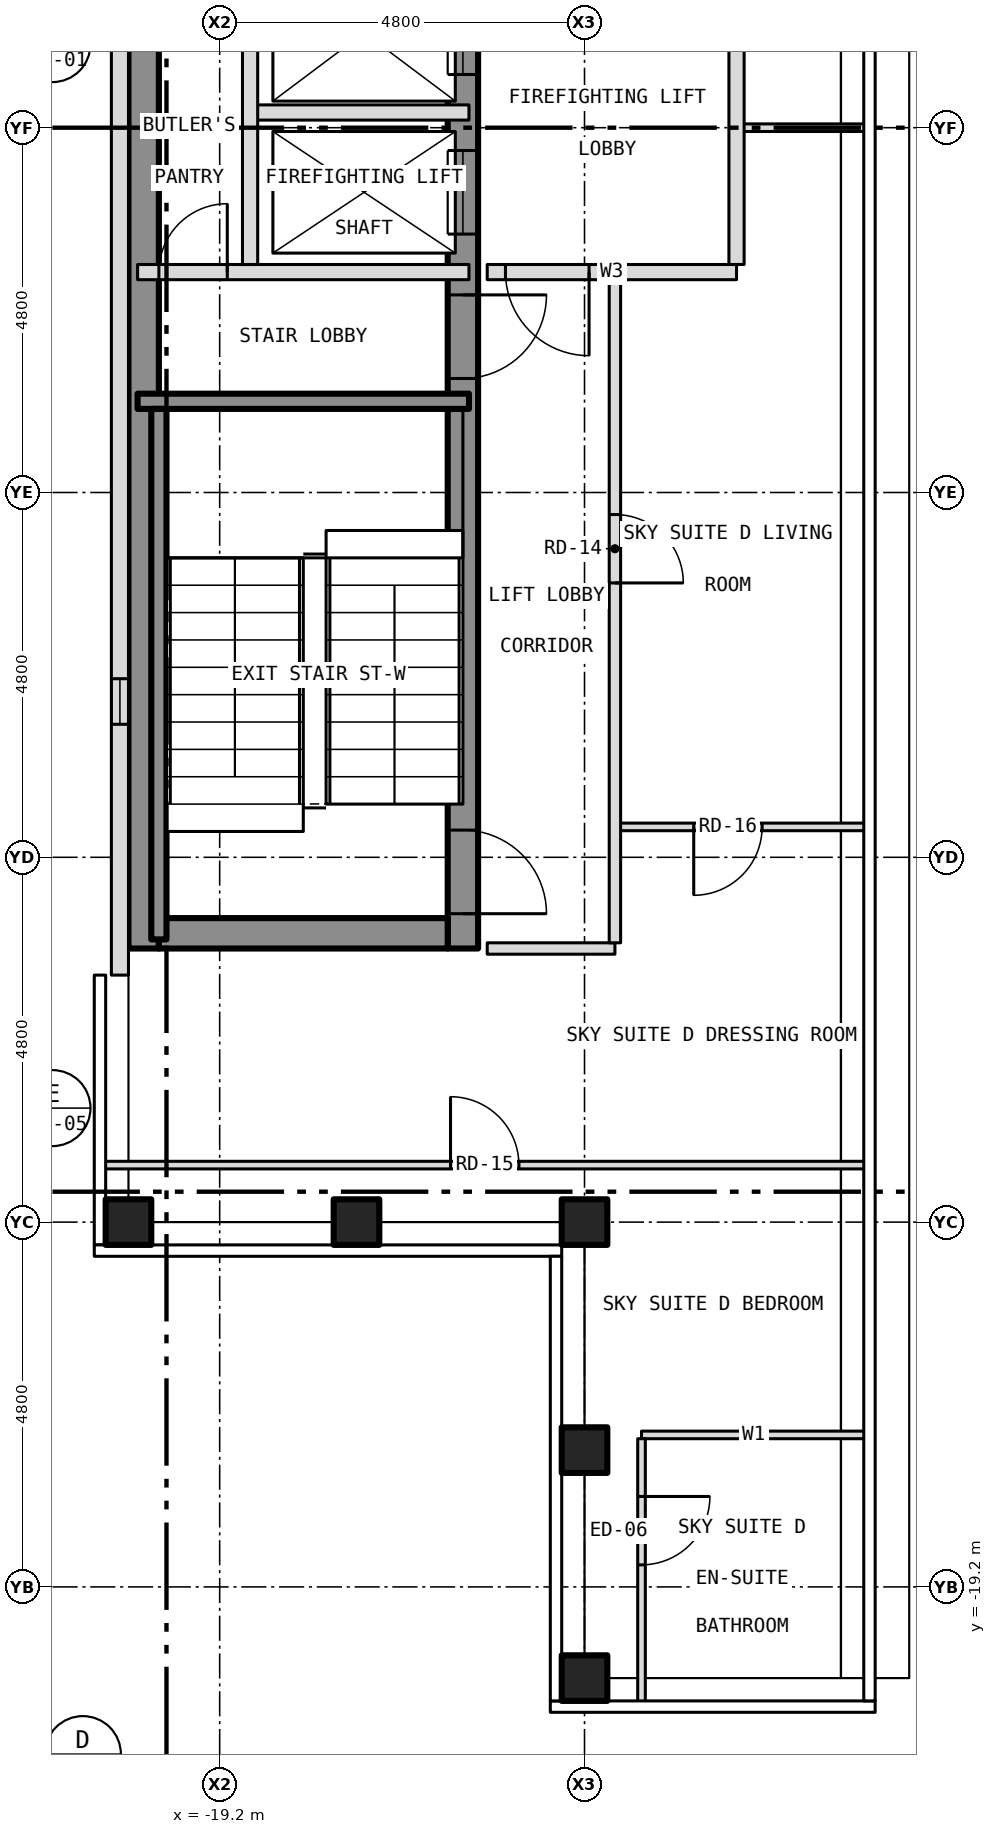
"""IFC4 building model, lengths in metres.
Left out: names, types, materials, properties, quantities, classifications, styles, units other than length and angle.
Written with IfcOpenShell. Run it as: python <this file> out.ifc"""

import sys

from ifc_helpers import new_model, si_unit, direction, frame, frame_2d, origin, origin_2d, place, context, subcontext, project, spatial, rectangle, hollow_rectangle, extrude, element, fill, save


model = new_model("IFC4")
c1 = context("Model", 3, precision=1e-05, world=origin(), true_north=direction((0.0, 1.0)))
c2 = subcontext(c1, "Body", "Model", "MODEL_VIEW")
j1 = project(units=[si_unit("LENGTHUNIT", "METRE"), si_unit("PLANEANGLEUNIT", "RADIAN")], contexts=[c1])
p1 = place(None, origin())
s1 = spatial("IfcSite", under=j1, at=p1, CompositionType="ELEMENT")
p2 = place(p1, origin())
s2 = spatial("IfcBuilding", under=s1, at=p2, CompositionType="ELEMENT")
p3 = place(p2, frame((0.0, 0.0, 283.0)))
s3 = spatial("IfcBuildingStorey", under=s2, at=p3, CompositionType="ELEMENT", Elevation=283.0)
for number, where, z_axis, x_axis in (
    (1, (-14.4, -20.4, -0.15), (0.0, 0.0, 1.0), (1.0, 0.0, 0.0)),
    (2, (-20.4, -14.4, -0.15), (0.0, 0.0, 1.0), (1.0, 0.0, 0.0)),
    (3, (-14.4, -14.4, -0.15), (0.0, 0.0, 1.0), (1.0, 0.0, 0.0)),
    (4, (-14.4, -17.4, -0.15), (0.0, 0.0, 1.0), (1.0, 0.0, 0.0)),
    (5, (-17.4, -14.4, -0.15), (0.0, 0.0, 1.0), (1.0, 0.0, 0.0)),
):
    element("IfcColumn", number, at=place(p3, frame(where, z_axis=z_axis, x_axis=x_axis)), inside=s3, PredefinedType="COLUMN", context=c2, shape_type="SweptSolid", body=[
        extrude(hollow_rectangle(XDim=0.6, YDim=0.6, WallThickness=0.03, at=origin_2d()), origin(), (0.0, 0.0, 1.0), 3.5),
    ])
p4 = place(p3, frame((-16.0, -10.8, 0.0), z_axis=(0.0, 0.0, 1.0), x_axis=(0.0, 1.0, 0.0)))
e6 = element("IfcWall", 6, at=p4, inside=s3, PredefinedType="SHEAR", context=c2, shape_type="SweptSolid", body=[
    extrude(rectangle(XDim=21.6, YDim=0.4, at=frame_2d((10.8, 0.0))), origin(), (0.0, 0.0, 1.0), 3.25),
])
p5 = place(p4, frame((9.4, 0.0, 0.0)))
e7 = element("IfcOpeningElement", 7, at=p5, cuts=e6, PredefinedType="OPENING", context=c2, shape_type="SweptSolid", body=[
    extrude(rectangle(XDim=1.1, YDim=2.1, at=frame_2d((0.55, 1.05))), frame((0.0, 0.212, 0.0), z_axis=(0.0, -1.0, 0.0), x_axis=(1.0, 0.0, 0.0)), (0.0, 0.0, 1.0), 0.424),
])
p6 = place(p4, frame((11.5, 0.0, 0.0)))
e8 = element("IfcOpeningElement", 8, at=p6, cuts=e6, PredefinedType="OPENING", context=c2, shape_type="SweptSolid", body=[
    extrude(rectangle(XDim=1.1, YDim=2.1, at=frame_2d((0.55, 1.05))), frame((0.0, 0.212, 0.0), z_axis=(0.0, -1.0, 0.0), x_axis=(1.0, 0.0, 0.0)), (0.0, 0.0, 1.0), 0.424),
])
p7 = place(p4, frame((13.6, 0.0, 0.0)))
e9 = element("IfcOpeningElement", 9, at=p7, cuts=e6, PredefinedType="OPENING", context=c2, shape_type="SweptSolid", body=[
    extrude(rectangle(XDim=1.1, YDim=2.1, at=frame_2d((0.55, 1.05))), frame((0.0, 0.212, 0.0), z_axis=(0.0, -1.0, 0.0), x_axis=(1.0, 0.0, 0.0)), (0.0, 0.0, 1.0), 0.424),
])
p8 = place(p4, frame((15.7, 0.0, 0.0)))
e10 = element("IfcOpeningElement", 10, at=p8, cuts=e6, PredefinedType="OPENING", context=c2, shape_type="SweptSolid", body=[
    extrude(rectangle(XDim=1.1, YDim=2.1, at=frame_2d((0.55, 1.05))), frame((0.0, 0.212, 0.0), z_axis=(0.0, -1.0, 0.0), x_axis=(1.0, 0.0, 0.0)), (0.0, 0.0, 1.0), 0.424),
])
p9 = place(p4, frame((17.8, 0.0, 0.0)))
e11 = element("IfcOpeningElement", 11, at=p9, cuts=e6, PredefinedType="OPENING", context=c2, shape_type="SweptSolid", body=[
    extrude(rectangle(XDim=1.1, YDim=2.1, at=frame_2d((0.55, 1.05))), frame((0.0, 0.212, 0.0), z_axis=(0.0, -1.0, 0.0), x_axis=(1.0, 0.0, 0.0)), (0.0, 0.0, 1.0), 0.424),
])
p10 = place(p4, frame((0.458, 0.0, 0.0)))
e12 = element("IfcOpeningElement", 12, at=p10, cuts=e6, PredefinedType="OPENING", context=c2, shape_type="SweptSolid", body=[
    extrude(rectangle(XDim=1.1, YDim=2.1, at=frame_2d((0.55, 1.05))), frame((0.0, 0.212, 0.0), z_axis=(0.0, -1.0, 0.0), x_axis=(1.0, 0.0, 0.0)), (0.0, 0.0, 1.0), 0.424),
])
p11 = place(p4, frame((7.5, 0.0, 0.0)))
e13 = element("IfcOpeningElement", 13, at=p11, cuts=e6, PredefinedType="OPENING", context=c2, shape_type="SweptSolid", body=[
    extrude(rectangle(XDim=1.1, YDim=2.1, at=frame_2d((0.55, 1.05))), frame((0.0, 0.212, 0.0), z_axis=(0.0, -1.0, 0.0), x_axis=(1.0, 0.0, 0.0)), (0.0, 0.0, 1.0), 0.424),
])
p12 = place(p4, frame((20.0, 0.0, 0.0)))
e14 = element("IfcOpeningElement", 14, at=p12, cuts=e6, PredefinedType="OPENING", context=c2, shape_type="SweptSolid", body=[
    extrude(rectangle(XDim=0.9, YDim=2.1, at=frame_2d((0.45, 1.05))), frame((0.0, 0.212, 0.0), z_axis=(0.0, -1.0, 0.0), x_axis=(1.0, 0.0, 0.0)), (0.0, 0.0, 1.0), 0.424),
])
p13 = place(p3, frame((-20.2, -10.8, 0.0), z_axis=(0.0, 0.0, 1.0), x_axis=(0.0, 1.0, 0.0)))
e15 = element("IfcWall", 15, at=p13, inside=s3, PredefinedType="SHEAR", context=c2, shape_type="SweptSolid", body=[
    extrude(rectangle(XDim=21.6, YDim=0.4, at=frame_2d((10.8, 0.0))), origin(), (0.0, 0.0, 1.0), 3.25),
])
p14 = place(p3, frame((-20.0, -10.6, 0.0), z_axis=(0.0, 0.0, 1.0), x_axis=(1.0, 0.0, 0.0)))
e16 = element("IfcWall", 16, at=p14, inside=s3, PredefinedType="SHEAR", context=c2, shape_type="SweptSolid", body=[
    extrude(rectangle(XDim=3.8, YDim=0.4, at=frame_2d((1.9, 0.0))), origin(), (0.0, 0.0, 1.0), 3.25),
])
p15 = place(p3, frame((-20.512, 11.15, 0.0), z_axis=(0.0, 0.0, 1.0), x_axis=(0.0, -1.0, 0.0)))
e17 = element("IfcWall", 17, at=p15, inside=s3, PredefinedType="SOLIDWALL", context=c2, shape_type="SweptSolid", body=[
    extrude(rectangle(XDim=22.3, YDim=0.225, at=frame_2d((11.15, 0.0))), origin(), (0.0, 0.0, 1.0), 3.5),
])
p16 = place(p15, frame((18.4, 0.0, 1.0)))
e18 = element("IfcOpeningElement", 18, at=p16, cuts=e17, PredefinedType="OPENING", context=c2, shape_type="SweptSolid", body=[
    extrude(rectangle(XDim=0.6, YDim=1.5, at=frame_2d((0.3, 0.75))), frame((0.0, 0.125, 0.0), z_axis=(0.0, -1.0, 0.0), x_axis=(1.0, 0.0, 0.0)), (0.0, 0.0, 1.0), 0.249),
])
p17 = place(p3, frame((-13.65, -17.2, 0.0), z_axis=(0.0, 0.0, 1.0), x_axis=(1.0, 0.0, 0.0)))
e19 = element("IfcWall", 19, at=p17, inside=s3, PredefinedType="PARTITIONING", context=c2, shape_type="SweptSolid", body=[
    extrude(rectangle(XDim=2.954, YDim=0.1, at=frame_2d((1.477, 0.0))), origin(), (0.0, 0.0, 1.0), 3.35),
])
p18 = place(p3, frame((-20.73, -13.65, 0.0), z_axis=(0.0, 0.0, 1.0), x_axis=(1.0, 0.0, 0.0)))
e20 = element("IfcWall", 20, at=p18, inside=s3, PredefinedType="PARTITIONING", context=c2, shape_type="SweptSolid", body=[
    extrude(rectangle(XDim=10.034, YDim=0.1, at=frame_2d((5.017, 0.0))), origin(), (0.0, 0.0, 1.0), 3.35),
])
p19 = place(p18, frame((4.567, 0.0, 0.0)))
e21 = element("IfcOpeningElement", 21, at=p19, cuts=e20, PredefinedType="OPENING", context=c2, shape_type="SweptSolid", body=[
    extrude(rectangle(XDim=0.9, YDim=2.1, at=frame_2d((0.45, 1.05))), frame((0.0, 0.062, 0.0), z_axis=(0.0, -1.0, 0.0), x_axis=(1.0, 0.0, 0.0)), (0.0, 0.0, 1.0), 0.124),
])
p20 = place(p3, frame((-15.68, -10.8, 0.0), z_axis=(0.0, 0.0, 1.0), x_axis=(1.0, 0.0, 0.0)))
e22 = element("IfcWall", 22, at=p20, inside=s3, PredefinedType="PARTITIONING", context=c2, shape_type="SweptSolid", body=[
    extrude(rectangle(XDim=1.68, YDim=0.15, at=frame_2d((0.84, 0.0))), origin(), (0.0, 0.0, 1.0), 3.35),
])
p21 = place(p3, frame((-14.0, -9.2, 0.0), z_axis=(0.0, 0.0, 1.0), x_axis=(1.0, 0.0, 0.0)))
e23 = element("IfcWall", 23, at=p21, inside=s3, PredefinedType="PARTITIONING", context=c2, shape_type="SweptSolid", body=[
    extrude(rectangle(XDim=3.304, YDim=0.1, at=frame_2d((1.652, 0.0))), origin(), (0.0, 0.0, 1.0), 3.35),
])
p22 = place(p21, frame((1.037, 0.0, 0.0)))
e24 = element("IfcOpeningElement", 24, at=p22, cuts=e23, PredefinedType="OPENING", context=c2, shape_type="SweptSolid", body=[
    extrude(rectangle(XDim=0.9, YDim=2.1, at=frame_2d((0.45, 1.05))), frame((0.0, 0.062, 0.0), z_axis=(0.0, -1.0, 0.0), x_axis=(1.0, 0.0, 0.0)), (0.0, 0.0, 1.0), 0.124),
])
p23 = place(p3, frame((-20.28, -3.6, 0.0), z_axis=(0.0, 0.0, 1.0), x_axis=(1.0, 0.0, 0.0)))
e25 = element("IfcWall", 25, at=p23, inside=s3, PredefinedType="SHEAR", context=c2, shape_type="SweptSolid", body=[
    extrude(rectangle(XDim=4.36, YDim=0.2, at=frame_2d((2.18, 0.0))), origin(), (0.0, 0.0, 1.0), 3.25),
])
p24 = place(p3, frame((-20.28, -1.9, 0.0), z_axis=(0.0, 0.0, 1.0), x_axis=(1.0, 0.0, 0.0)))
e26 = element("IfcWall", 26, at=p24, inside=s3, PredefinedType="PARTITIONING", context=c2, shape_type="SweptSolid", body=[
    extrude(rectangle(XDim=4.36, YDim=0.2, at=frame_2d((2.18, 0.0))), origin(), (0.0, 0.0, 1.0), 3.25),
])
p25 = place(p24, frame((0.28, 0.0, 0.0)))
e27 = element("IfcOpeningElement", 27, at=p25, cuts=e26, PredefinedType="OPENING", context=c2, shape_type="SweptSolid", body=[
    extrude(rectangle(XDim=0.9, YDim=2.1, at=frame_2d((0.45, 1.05))), frame((0.0, 0.112, 0.0), z_axis=(0.0, -1.0, 0.0), x_axis=(1.0, 0.0, 0.0)), (0.0, 0.0, 1.0), 0.224),
])
p26 = place(p3, frame((-15.68, -1.9, 0.0), z_axis=(0.0, 0.0, 1.0), x_axis=(1.0, 0.0, 0.0)))
e28 = element("IfcWall", 28, at=p26, inside=s3, PredefinedType="PARTITIONING", context=c2, shape_type="SweptSolid", body=[
    extrude(rectangle(XDim=3.28, YDim=0.2, at=frame_2d((1.64, 0.0))), origin(), (0.0, 0.0, 1.0), 3.35),
])
p27 = place(p26, frame((0.24, 0.0, 0.0)))
e29 = element("IfcOpeningElement", 29, at=p27, cuts=e28, PredefinedType="OPENING", context=c2, shape_type="SweptSolid", body=[
    extrude(rectangle(XDim=1.1, YDim=2.1, at=frame_2d((0.55, 1.05))), frame((0.0, 0.112, 0.0), z_axis=(0.0, -1.0, 0.0), x_axis=(1.0, 0.0, 0.0)), (0.0, 0.0, 1.0), 0.224),
])
p28 = place(p3, frame((-12.4, 0.0, 0.0), z_axis=(0.0, 0.0, 1.0), x_axis=(1.0, 0.0, 0.0)))
e30 = element("IfcWall", 30, at=p28, inside=s3, PredefinedType="PARTITIONING", context=c2, shape_type="SweptSolid", body=[
    extrude(rectangle(XDim=1.704, YDim=0.1, at=frame_2d((0.852, 0.0))), origin(), (0.0, 0.0, 1.0), 2.728),
])
p29 = place(p3, frame((-18.8, 0.2, 0.0), z_axis=(0.0, 0.0, 1.0), x_axis=(1.0, 0.0, 0.0)))
e31 = element("IfcWall", 31, at=p29, inside=s3, PredefinedType="PARTITIONING", context=c2, shape_type="SweptSolid", body=[
    extrude(rectangle(XDim=2.88, YDim=0.2, at=frame_2d((1.44, 0.0))), origin(), (0.0, 0.0, 1.0), 3.25),
])
p30 = place(p3, frame((-20.0, -10.68, 0.0), z_axis=(0.0, 0.0, 1.0), x_axis=(0.0, 1.0, 0.0)))
e32 = element("IfcWall", 32, at=p30, inside=s3, PredefinedType="SHEAR", context=c2, shape_type="SweptSolid", body=[
    extrude(rectangle(XDim=6.98, YDim=0.2, at=frame_2d((3.49, 0.0))), origin(), (0.0, 0.0, 1.0), 3.25),
])
p31 = place(p3, frame((-18.8, -1.8, 0.0), z_axis=(0.0, 0.0, 1.0), x_axis=(0.0, 1.0, 0.0)))
e33 = element("IfcWall", 33, at=p31, inside=s3, PredefinedType="PARTITIONING", context=c2, shape_type="SweptSolid", body=[
    extrude(rectangle(XDim=10.3, YDim=0.2, at=frame_2d((5.15, 0.0))), origin(), (0.0, 0.0, 1.0), 3.25),
])
p32 = place(p3, frame((-14.0, -10.725, 0.0), z_axis=(0.0, 0.0, 1.0), x_axis=(0.0, 1.0, 0.0)))
e34 = element("IfcWall", 34, at=p32, inside=s3, PredefinedType="PARTITIONING", context=c2, shape_type="SweptSolid", body=[
    extrude(rectangle(XDim=8.725, YDim=0.15, at=frame_2d((4.363, 0.0))), origin(), (0.0, 0.0, 1.0), 3.35),
])
p33 = place(p32, frame((4.735, 0.0, 0.0)))
e35 = element("IfcOpeningElement", 35, at=p33, cuts=e34, PredefinedType="OPENING", context=c2, shape_type="SweptSolid", body=[
    extrude(rectangle(XDim=0.9, YDim=2.1, at=frame_2d((0.45, 1.05))), frame((0.0, 0.087, 0.0), z_axis=(0.0, -1.0, 0.0), x_axis=(1.0, 0.0, 0.0)), (0.0, 0.0, 1.0), 0.174),
])
p34 = place(p3, frame((-13.65, -20.73, 0.0), z_axis=(0.0, 0.0, 1.0), x_axis=(0.0, 1.0, 0.0)))
e36 = element("IfcWall", 36, at=p34, inside=s3, PredefinedType="PARTITIONING", context=c2, shape_type="SweptSolid", body=[
    extrude(rectangle(XDim=3.48, YDim=0.1, at=frame_2d((1.74, 0.0))), origin(), (0.0, 0.0, 1.0), 3.35),
])
p35 = place(p34, frame((1.82, 0.0, 0.0)))
e37 = element("IfcOpeningElement", 37, at=p35, cuts=e36, PredefinedType="OPENING", context=c2, shape_type="SweptSolid", body=[
    extrude(rectangle(XDim=0.9, YDim=2.1, at=frame_2d((0.45, 1.05))), frame((0.0, 0.062, 0.0), z_axis=(0.0, -1.0, 0.0), x_axis=(1.0, 0.0, 0.0)), (0.0, 0.0, 1.0), 0.124),
])
p36 = place(p3, frame((-12.4, -1.8, 0.0), z_axis=(0.0, 0.0, 1.0), x_axis=(0.0, 1.0, 0.0)))
e38 = element("IfcWall", 38, at=p36, inside=s3, PredefinedType="PARTITIONING", context=c2, shape_type="SweptSolid", body=[
    extrude(rectangle(XDim=4.0, YDim=0.2, at=frame_2d((2.0, 0.0))), origin(), (0.0, 0.0, 1.0), 3.35),
])
p37 = place(p16, origin())
e39 = element("IfcWindow", 39, at=p37, inside=s3, PartitioningType="SINGLE_PANEL", PredefinedType="WINDOW", context=c2, shape_type="SweptSolid", body=[
    extrude(rectangle(XDim=0.6, YDim=1.5, at=frame_2d((0.3, 0.75))), frame((0.0, -0.022, 0.0), z_axis=(0.0, -1.0, 0.0), x_axis=(1.0, 0.0, 0.0)), (0.0, 0.0, 1.0), 0.06),
])
fill(e18, e39)
p38 = place(p5, origin())
e40 = element("IfcDoor", 40, at=p38, inside=s3, OperationType="SLIDING_TO_LEFT", PredefinedType="DOOR", context=c2, shape_type="SweptSolid", body=[
    extrude(rectangle(XDim=1.1, YDim=2.1, at=frame_2d((0.55, 1.05))), frame((0.0, 0.025, 0.0), z_axis=(0.0, -1.0, 0.0), x_axis=(1.0, 0.0, 0.0)), (0.0, 0.0, 1.0), 0.05),
])
fill(e7, e40)
p39 = place(p6, origin())
e41 = element("IfcDoor", 41, at=p39, inside=s3, OperationType="SLIDING_TO_LEFT", PredefinedType="DOOR", context=c2, shape_type="SweptSolid", body=[
    extrude(rectangle(XDim=1.1, YDim=2.1, at=frame_2d((0.55, 1.05))), frame((0.0, 0.025, 0.0), z_axis=(0.0, -1.0, 0.0), x_axis=(1.0, 0.0, 0.0)), (0.0, 0.0, 1.0), 0.05),
])
fill(e8, e41)
p40 = place(p10, origin())
e42 = element("IfcDoor", 42, at=p40, inside=s3, OperationType="SINGLE_SWING_LEFT", PredefinedType="DOOR", context=c2, shape_type="SweptSolid", body=[
    extrude(rectangle(XDim=1.1, YDim=2.1, at=frame_2d((0.55, 1.05))), frame((0.0, 0.025, 0.0), z_axis=(0.0, -1.0, 0.0), x_axis=(1.0, 0.0, 0.0)), (0.0, 0.0, 1.0), 0.05),
])
fill(e12, e42)
p41 = place(p11, origin())
e43 = element("IfcDoor", 43, at=p41, inside=s3, OperationType="SINGLE_SWING_RIGHT", PredefinedType="DOOR", context=c2, shape_type="SweptSolid", body=[
    extrude(rectangle(XDim=1.1, YDim=2.1, at=frame_2d((0.55, 1.05))), frame((0.0, 0.025, 0.0), z_axis=(0.0, -1.0, 0.0), x_axis=(1.0, 0.0, 0.0)), (0.0, 0.0, 1.0), 0.05),
])
fill(e13, e43)
p42 = place(p25, origin())
e44 = element("IfcDoor", 44, at=p42, inside=s3, OperationType="SINGLE_SWING_RIGHT", PredefinedType="DOOR", context=c2, shape_type="SweptSolid", body=[
    extrude(rectangle(XDim=0.9, YDim=2.1, at=frame_2d((0.45, 1.05))), frame((0.0, 0.025, 0.0), z_axis=(0.0, -1.0, 0.0), x_axis=(1.0, 0.0, 0.0)), (0.0, 0.0, 1.0), 0.05),
])
fill(e27, e44)
p43 = place(p27, origin())
e45 = element("IfcDoor", 45, at=p43, inside=s3, OperationType="SINGLE_SWING_RIGHT", PredefinedType="DOOR", context=c2, shape_type="SweptSolid", body=[
    extrude(rectangle(XDim=1.1, YDim=2.1, at=frame_2d((0.55, 1.05))), frame((0.0, 0.025, 0.0), z_axis=(0.0, -1.0, 0.0), x_axis=(1.0, 0.0, 0.0)), (0.0, 0.0, 1.0), 0.05),
])
fill(e29, e45)
p44 = place(p33, origin())
e46 = element("IfcDoor", 46, at=p44, inside=s3, OperationType="SINGLE_SWING_LEFT", PredefinedType="DOOR", context=c2, shape_type="SweptSolid", body=[
    extrude(rectangle(XDim=0.9, YDim=2.1, at=frame_2d((0.45, 1.05))), frame((0.0, 0.025, 0.0), z_axis=(0.0, -1.0, 0.0), x_axis=(1.0, 0.0, 0.0)), (0.0, 0.0, 1.0), 0.05),
])
fill(e35, e46)
p45 = place(p35, origin())
e47 = element("IfcDoor", 47, at=p45, inside=s3, OperationType="SINGLE_SWING_RIGHT", PredefinedType="DOOR", context=c2, shape_type="SweptSolid", body=[
    extrude(rectangle(XDim=0.9, YDim=2.1, at=frame_2d((0.45, 1.05))), frame((0.0, 0.025, 0.0), z_axis=(0.0, -1.0, 0.0), x_axis=(1.0, 0.0, 0.0)), (0.0, 0.0, 1.0), 0.05),
])
fill(e37, e47)
p46 = place(p19, origin())
e48 = element("IfcDoor", 48, at=p46, inside=s3, OperationType="SINGLE_SWING_LEFT", PredefinedType="DOOR", context=c2, shape_type="SweptSolid", body=[
    extrude(rectangle(XDim=0.9, YDim=2.1, at=frame_2d((0.45, 1.05))), frame((0.0, 0.025, 0.0), z_axis=(0.0, -1.0, 0.0), x_axis=(1.0, 0.0, 0.0)), (0.0, 0.0, 1.0), 0.05),
])
fill(e21, e48)
p47 = place(p22, origin())
e49 = element("IfcDoor", 49, at=p47, inside=s3, OperationType="SINGLE_SWING_LEFT", PredefinedType="DOOR", context=c2, shape_type="SweptSolid", body=[
    extrude(rectangle(XDim=0.9, YDim=2.1, at=frame_2d((0.45, 1.05))), frame((0.0, 0.025, 0.0), z_axis=(0.0, -1.0, 0.0), x_axis=(1.0, 0.0, 0.0)), (0.0, 0.0, 1.0), 0.05),
])
fill(e24, e49)
save(model, sys.argv[1])
